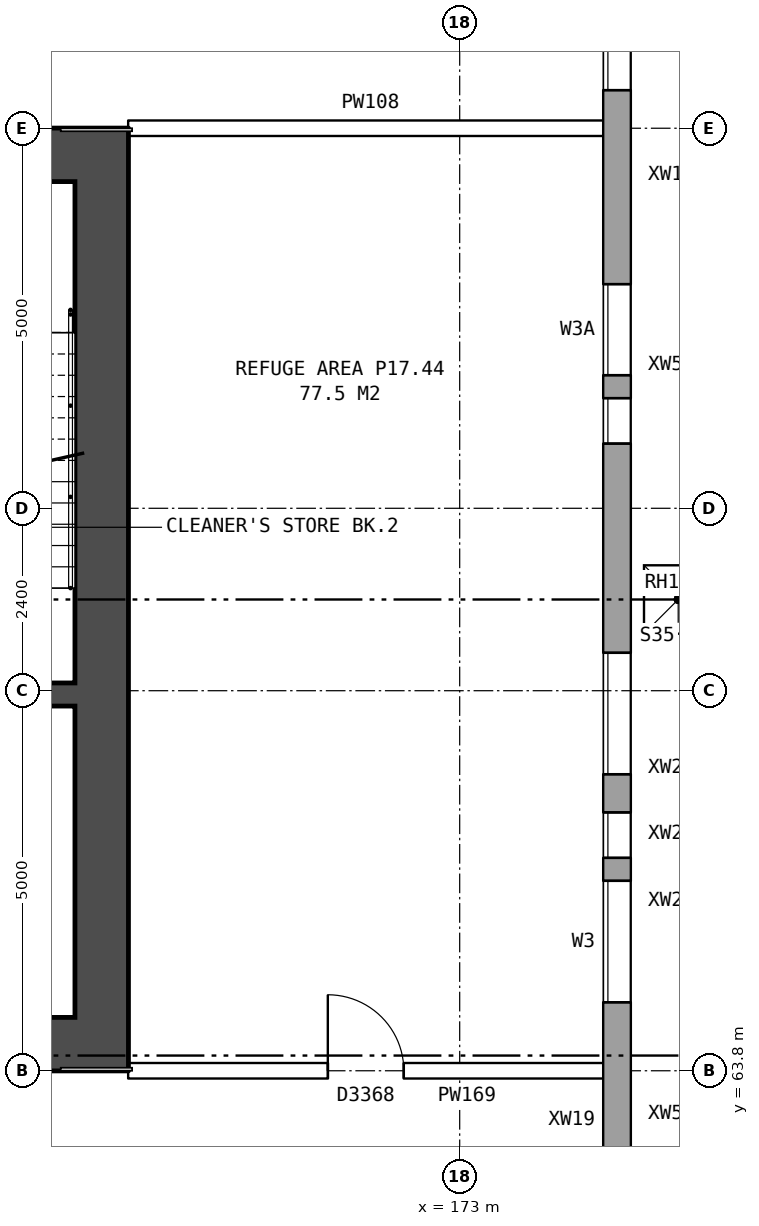
"""IFC4 building model, lengths in metres.
Left out: names, types, materials, properties, quantities, classifications, styles, units other than length and angle.
Written with IfcOpenShell. Run it as: python <this file> out.ifc"""

import sys

from ifc_helpers import new_model, si_unit, direction, frame, frame_2d, origin, origin_2d, place, context, subcontext, project, spatial, rectangle, extrude, element, fill, save


model = new_model("IFC4")
c1 = context("Model", 3, precision=1e-05, world=origin(), true_north=direction((0.0, 1.0)))
c2 = subcontext(c1, "Body", "Model", "MODEL_VIEW")
j1 = project(units=[si_unit("LENGTHUNIT", "METRE"), si_unit("PLANEANGLEUNIT", "RADIAN")], contexts=[c1])
p1 = place(None, origin())
s1 = spatial("IfcSite", under=j1, at=p1, CompositionType="ELEMENT")
p2 = place(p1, origin())
s2 = spatial("IfcBuilding", under=s1, at=p2, CompositionType="ELEMENT")
p3 = place(p2, frame((0.0, 0.0, 62.9)))
s3 = spatial("IfcBuildingStorey", under=s2, at=p3, CompositionType="ELEMENT", Elevation=62.9)
p4 = place(p3, frame((175.07, 57.075, 0.0), z_axis=(0.0, 0.0, 1.0), x_axis=(0.0, 1.0, 0.0)))
e1 = element("IfcWall", 1, at=p4, inside=s3, PredefinedType="STANDARD", context=c2, shape_type="SweptSolid", body=[
    extrude(rectangle(XDim=25.851, YDim=0.36, at=frame_2d((12.925, 0.0))), origin(), (0.0, 0.0, 1.0), 4.2),
])
p5 = place(p4, frame((2.6, 0.0, 1.5)))
e2 = element("IfcOpeningElement", 2, at=p5, cuts=e1, PredefinedType="OPENING", context=c2, shape_type="SweptSolid", body=[
    extrude(rectangle(XDim=0.9, YDim=1.2, at=frame_2d((0.45, 0.6))), frame((0.0, 0.19, 0.0), z_axis=(0.0, -1.0, 0.0), x_axis=(1.0, 0.0, 0.0)), (0.0, 0.0, 1.0), 0.38),
])
p6 = place(p4, frame((3.925, 0.0, 1.5)))
e3 = element("IfcOpeningElement", 3, at=p6, cuts=e1, PredefinedType="OPENING", context=c2, shape_type="SweptSolid", body=[
    extrude(rectangle(XDim=0.6, YDim=1.2, at=frame_2d((0.3, 0.6))), frame((0.0, 0.19, 0.0), z_axis=(0.0, -1.0, 0.0), x_axis=(1.0, 0.0, 0.0)), (0.0, 0.0, 1.0), 0.38),
])
p7 = place(p4, frame((7.625, 0.0, 1.5)))
e4 = element("IfcOpeningElement", 4, at=p7, cuts=e1, PredefinedType="OPENING", context=c2, shape_type="SweptSolid", body=[
    extrude(rectangle(XDim=1.6, YDim=1.2, at=frame_2d((0.8, 0.6))), frame((0.0, 0.19, 0.0), z_axis=(0.0, -1.0, 0.0), x_axis=(1.0, 0.0, 0.0)), (0.0, 0.0, 1.0), 0.38),
])
p8 = place(p4, frame((10.625, 0.0, 1.5)))
e5 = element("IfcOpeningElement", 5, at=p8, cuts=e1, PredefinedType="OPENING", context=c2, shape_type="SweptSolid", body=[
    extrude(rectangle(XDim=1.6, YDim=1.2, at=frame_2d((0.8, 0.6))), frame((0.0, 0.19, 0.0), z_axis=(0.0, -1.0, 0.0), x_axis=(1.0, 0.0, 0.0)), (0.0, 0.0, 1.0), 0.38),
])
p9 = place(p4, frame((9.525, 0.0, 1.5)))
e6 = element("IfcOpeningElement", 6, at=p9, cuts=e1, PredefinedType="OPENING", context=c2, shape_type="SweptSolid", body=[
    extrude(rectangle(XDim=0.6, YDim=1.2, at=frame_2d((0.3, 0.6))), frame((0.0, 0.19, 0.0), z_axis=(0.0, -1.0, 0.0), x_axis=(1.0, 0.0, 0.0)), (0.0, 0.0, 1.0), 0.38),
])
p10 = place(p4, frame((14.975, 0.0, 1.5)))
e7 = element("IfcOpeningElement", 7, at=p10, cuts=e1, PredefinedType="OPENING", context=c2, shape_type="SweptSolid", body=[
    extrude(rectangle(XDim=0.6, YDim=1.2, at=frame_2d((0.3, 0.6))), frame((0.0, 0.19, 0.0), z_axis=(0.0, -1.0, 0.0), x_axis=(1.0, 0.0, 0.0)), (0.0, 0.0, 1.0), 0.38),
])
p11 = place(p4, frame((19.625, 0.0, 1.5)))
e8 = element("IfcOpeningElement", 8, at=p11, cuts=e1, PredefinedType="OPENING", context=c2, shape_type="SweptSolid", body=[
    extrude(rectangle(XDim=1.6, YDim=1.2, at=frame_2d((0.8, 0.6))), frame((0.0, 0.19, 0.0), z_axis=(0.0, -1.0, 0.0), x_axis=(1.0, 0.0, 0.0)), (0.0, 0.0, 1.0), 0.38),
])
p12 = place(p4, frame((22.625, 0.0, 1.5)))
e9 = element("IfcOpeningElement", 9, at=p12, cuts=e1, PredefinedType="OPENING", context=c2, shape_type="SweptSolid", body=[
    extrude(rectangle(XDim=1.6, YDim=1.2, at=frame_2d((0.8, 0.6))), frame((0.0, 0.19, 0.0), z_axis=(0.0, -1.0, 0.0), x_axis=(1.0, 0.0, 0.0)), (0.0, 0.0, 1.0), 0.38),
])
p13 = place(p4, frame((15.875, 0.0, 1.5)))
e10 = element("IfcOpeningElement", 10, at=p13, cuts=e1, PredefinedType="OPENING", context=c2, shape_type="SweptSolid", body=[
    extrude(rectangle(XDim=1.2, YDim=1.2, at=frame_2d((0.6, 0.6))), frame((0.0, 0.19, 0.0), z_axis=(0.0, -1.0, 0.0), x_axis=(1.0, 0.0, 0.0)), (0.0, 0.0, 1.0), 0.38),
])
p14 = place(p3, frame((168.29, 75.5, 0.0), z_axis=(0.0, 0.0, 1.0), x_axis=(0.0, -1.0, 0.0)))
e11 = element("IfcWall", 11, at=p14, inside=s3, PredefinedType="SHEAR", context=c2, shape_type="SweptSolid", body=[
    extrude(rectangle(XDim=11.0, YDim=0.7, at=frame_2d((5.5, 0.0))), origin(), (0.0, 0.0, 1.0), 4.2),
])
for number, where, z_axis, x_axis in (
    (12, (160.24, 75.85, 0.0), (0.0, 0.0, 1.0), (1.0, 0.0, 0.0)),
    (13, (160.24, 64.15, 0.0), (0.0, 0.0, 1.0), (1.0, 0.0, 0.0)),
):
    element("IfcWall", number, at=place(p3, frame(where, z_axis=z_axis, x_axis=x_axis)), inside=s3, PredefinedType="SHEAR", context=c2, shape_type="SweptSolid", body=[
        extrude(rectangle(XDim=8.4, YDim=0.7, at=frame_2d((4.2, 0.0))), origin(), (0.0, 0.0, 1.0), 4.2),
    ])
p15 = place(p3, frame((160.94, 68.75, 0.0), z_axis=(0.0, 0.0, 1.0), x_axis=(1.0, 0.0, 0.0)))
e14 = element("IfcWall", 14, at=p15, inside=s3, PredefinedType="SHEAR", context=c2, shape_type="SweptSolid", body=[
    extrude(rectangle(XDim=7.0, YDim=0.3, at=frame_2d((3.5, 0.0))), origin(), (0.0, 0.0, 1.0), 4.2),
])
p16 = place(p15, frame((4.6, 0.0, 0.0)))
e15 = element("IfcOpeningElement", 15, at=p16, cuts=e14, PredefinedType="OPENING", context=c2, shape_type="SweptSolid", body=[
    extrude(rectangle(XDim=1.1, YDim=2.1, at=frame_2d((0.55, 1.05))), frame((0.0, 0.16, 0.0), z_axis=(0.0, -1.0, 0.0), x_axis=(1.0, 0.0, 0.0)), (0.0, 0.0, 1.0), 0.32),
])
p17 = place(p15, frame((2.675, 0.0, 0.0)))
e16 = element("IfcOpeningElement", 16, at=p17, cuts=e14, PredefinedType="OPENING", context=c2, shape_type="SweptSolid", body=[
    extrude(rectangle(XDim=0.85, YDim=2.1, at=frame_2d((0.425, 1.05))), frame((0.0, 0.16, 0.0), z_axis=(0.0, -1.0, 0.0), x_axis=(1.0, 0.0, 0.0)), (0.0, 0.0, 1.0), 0.32),
])
p18 = place(p3, frame((168.64, 63.8, 0.0), z_axis=(0.0, 0.0, 1.0), x_axis=(1.0, 0.0, 0.0)))
e17 = element("IfcWall", 17, at=p18, inside=s3, PredefinedType="PARTITIONING", context=c2, shape_type="SweptSolid", body=[
    extrude(rectangle(XDim=6.37, YDim=0.2, at=frame_2d((3.185, 0.0))), origin(), (0.0, 0.0, 1.0), 4.2),
])
p19 = place(p18, frame((2.625, 0.0, 0.0)))
e18 = element("IfcOpeningElement", 18, at=p19, cuts=e17, PredefinedType="OPENING", context=c2, shape_type="SweptSolid", body=[
    extrude(rectangle(XDim=1.0, YDim=2.1, at=frame_2d((0.5, 1.05))), frame((0.0, 0.11, 0.0), z_axis=(0.0, -1.0, 0.0), x_axis=(1.0, 0.0, 0.0)), (0.0, 0.0, 1.0), 0.22),
])
p20 = place(p3, frame((168.64, 76.2, 0.0), z_axis=(0.0, 0.0, 1.0), x_axis=(1.0, 0.0, 0.0)))
e19 = element("IfcWall", 19, at=p20, inside=s3, PredefinedType="PARTITIONING", context=c2, shape_type="SweptSolid", body=[
    extrude(rectangle(XDim=6.37, YDim=0.2, at=frame_2d((3.185, 0.0))), origin(), (0.0, 0.0, 1.0), 4.2),
])
p21 = place(p7, origin())
e20 = element("IfcWindow", 20, at=p21, inside=s3, PartitioningType="DOUBLE_PANEL_HORIZONTAL", PredefinedType="WINDOW", context=c2, shape_type="SweptSolid", body=[
    extrude(rectangle(XDim=1.6, YDim=1.2, at=frame_2d((0.8, 0.6))), frame((0.0, 0.15, 0.0), z_axis=(0.0, -1.0, 0.0), x_axis=(1.0, 0.0, 0.0)), (0.0, 0.0, 1.0), 0.06),
])
fill(e4, e20)
p22 = place(p8, origin())
e21 = element("IfcWindow", 21, at=p22, inside=s3, PartitioningType="DOUBLE_PANEL_HORIZONTAL", PredefinedType="WINDOW", context=c2, shape_type="SweptSolid", body=[
    extrude(rectangle(XDim=1.6, YDim=1.2, at=frame_2d((0.8, 0.6))), frame((0.0, 0.15, 0.0), z_axis=(0.0, -1.0, 0.0), x_axis=(1.0, 0.0, 0.0)), (0.0, 0.0, 1.0), 0.06),
])
fill(e5, e21)
p23 = place(p9, origin())
e22 = element("IfcWindow", 22, at=p23, inside=s3, PartitioningType="DOUBLE_PANEL_HORIZONTAL", PredefinedType="WINDOW", context=c2, shape_type="SweptSolid", body=[
    extrude(rectangle(XDim=0.6, YDim=1.2, at=frame_2d((0.3, 0.6))), frame((0.0, 0.15, 0.0), z_axis=(0.0, -1.0, 0.0), x_axis=(1.0, 0.0, 0.0)), (0.0, 0.0, 1.0), 0.06),
])
fill(e6, e22)
p24 = place(p10, origin())
e23 = element("IfcWindow", 23, at=p24, inside=s3, PartitioningType="DOUBLE_PANEL_HORIZONTAL", PredefinedType="WINDOW", context=c2, shape_type="SweptSolid", body=[
    extrude(rectangle(XDim=0.6, YDim=1.2, at=frame_2d((0.3, 0.6))), frame((0.0, 0.15, 0.0), z_axis=(0.0, -1.0, 0.0), x_axis=(1.0, 0.0, 0.0)), (0.0, 0.0, 1.0), 0.06),
])
fill(e7, e23)
p25 = place(p11, origin())
e24 = element("IfcWindow", 24, at=p25, inside=s3, PartitioningType="DOUBLE_PANEL_HORIZONTAL", PredefinedType="WINDOW", context=c2, shape_type="SweptSolid", body=[
    extrude(rectangle(XDim=1.6, YDim=1.2, at=frame_2d((0.8, 0.6))), frame((0.0, 0.15, 0.0), z_axis=(0.0, -1.0, 0.0), x_axis=(1.0, 0.0, 0.0)), (0.0, 0.0, 1.0), 0.06),
])
fill(e8, e24)
p26 = place(p3, frame((0.0, 0.0, -0.25)))
p27 = place(p26, frame((175.875, 70.0, 0.0)))
p28 = place(p27, frame((0.0, 0.0, 0.2)))
e25 = element("IfcWindow", 25, at=p28, inside=s3, PartitioningType="SINGLE_PANEL", PredefinedType="SKYLIGHT", context=c2, shape_type="SweptSolid", body=[
    extrude(rectangle(XDim=0.9, YDim=0.9, at=origin_2d()), origin(), (0.0, 0.0, 1.0), 0.05),
])
p29 = place(p19, origin())
e26 = element("IfcDoor", 26, at=p29, inside=s3, OperationType="SINGLE_SWING_LEFT", PredefinedType="DOOR", context=c2, shape_type="SweptSolid", body=[
    extrude(rectangle(XDim=1.0, YDim=2.1, at=frame_2d((0.5, 1.05))), frame((0.0, 0.025, 0.0), z_axis=(0.0, -1.0, 0.0), x_axis=(1.0, 0.0, 0.0)), (0.0, 0.0, 1.0), 0.05),
])
fill(e18, e26)
p30 = place(p13, origin())
e27 = element("IfcWindow", 27, at=p30, inside=s3, PartitioningType="DOUBLE_PANEL_HORIZONTAL", PredefinedType="WINDOW", context=c2, shape_type="SweptSolid", body=[
    extrude(rectangle(XDim=1.2, YDim=1.2, at=frame_2d((0.6, 0.6))), frame((0.0, 0.15, 0.0), z_axis=(0.0, -1.0, 0.0), x_axis=(1.0, 0.0, 0.0)), (0.0, 0.0, 1.0), 0.06),
])
fill(e10, e27)
save(model, sys.argv[1])
